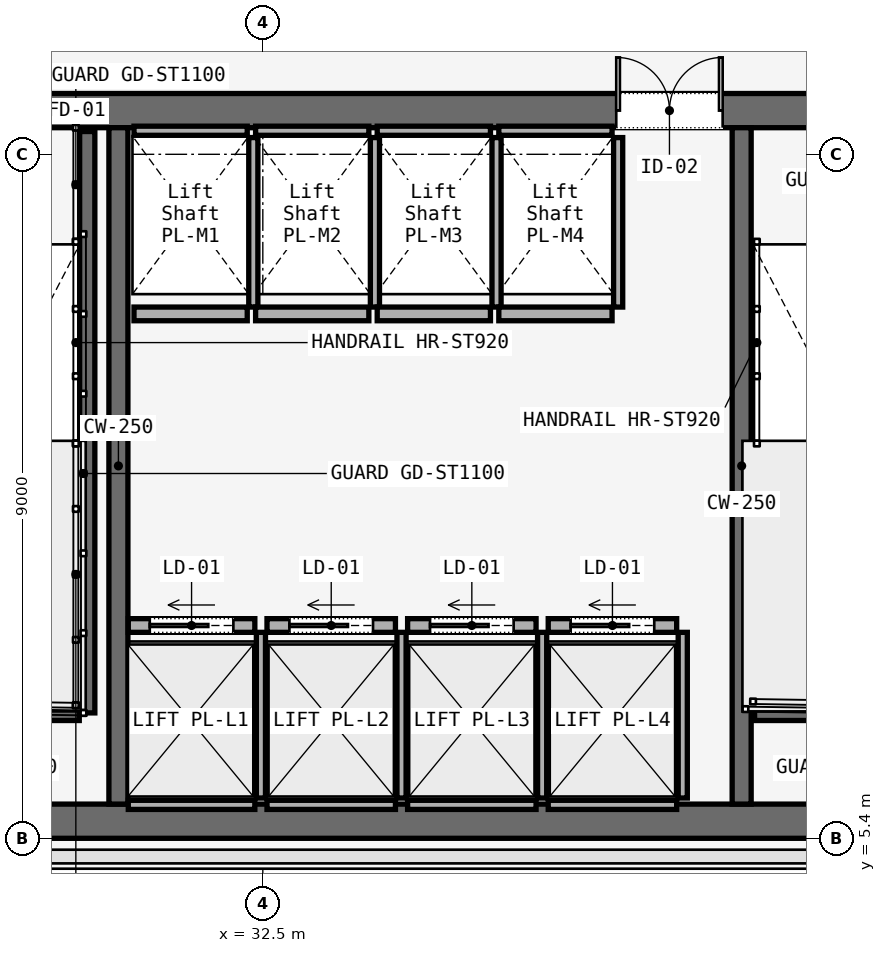
"""IFC4 building model, lengths in metres.
Left out: names, types, materials, properties, quantities, classifications, styles, units other than length and angle.
Written with IfcOpenShell. Run it as: python <this file> out.ifc"""

import sys

from ifc_helpers import new_model, si_unit, direction, frame, frame_2d, origin, place, context, subcontext, project, spatial, rectangle, extrude, element, fill, save


model = new_model("IFC4")
c1 = context("Model", 3, precision=1e-05, world=origin(), true_north=direction((0.0, 1.0)))
c2 = subcontext(c1, "Body", "Model", "MODEL_VIEW")
j1 = project(units=[si_unit("LENGTHUNIT", "METRE"), si_unit("PLANEANGLEUNIT", "RADIAN")], contexts=[c1])
p1 = place(None, origin())
s1 = spatial("IfcSite", under=j1, at=p1, CompositionType="ELEMENT")
p2 = place(p1, origin())
s2 = spatial("IfcBuilding", under=s1, at=p2, CompositionType="ELEMENT")
p3 = place(p2, frame((0.0, 0.0, 96.8)))
s3 = spatial("IfcBuildingStorey", under=s2, at=p3, CompositionType="ELEMENT", Elevation=96.8)
p4 = place(p3, frame((26.45, 14.975, 0.0), z_axis=(0.0, 0.0, 1.0), x_axis=(1.0, 0.0, 0.0)))
e1 = element("IfcWall", 1, at=p4, inside=s3, PredefinedType="SOLIDWALL", context=c2, shape_type="SweptSolid", body=[
    extrude(rectangle(XDim=31.1, YDim=0.45, at=frame_2d((15.55, 0.0))), origin(), (0.0, 0.0, 1.0), 3.58),
])
p5 = place(p4, frame((1.65, 0.0, 0.0)))
e2 = element("IfcOpeningElement", 2, at=p5, cuts=e1, PredefinedType="OPENING", context=c2, shape_type="SweptSolid", body=[
    extrude(rectangle(XDim=1.1, YDim=2.2, at=frame_2d((0.55, 1.1))), frame((0.0, 0.225, 0.0), z_axis=(0.0, -1.0, 0.0), x_axis=(1.0, 0.0, 0.0)), (0.0, 0.0, 1.0), 0.45),
])
p6 = place(p4, frame((13.65, 0.0, 0.0)))
e3 = element("IfcOpeningElement", 3, at=p6, cuts=e1, PredefinedType="OPENING", context=c2, shape_type="SweptSolid", body=[
    extrude(rectangle(XDim=1.1, YDim=2.2, at=frame_2d((0.55, 1.1))), frame((0.0, 0.225, 0.0), z_axis=(0.0, -1.0, 0.0), x_axis=(1.0, 0.0, 0.0)), (0.0, 0.0, 1.0), 0.45),
])
p7 = place(p4, frame((25.55, 0.0, 0.0)))
e4 = element("IfcOpeningElement", 4, at=p7, cuts=e1, PredefinedType="OPENING", context=c2, shape_type="SweptSolid", body=[
    extrude(rectangle(XDim=1.1, YDim=2.2, at=frame_2d((0.55, 1.1))), frame((0.0, 0.225, 0.0), z_axis=(0.0, -1.0, 0.0), x_axis=(1.0, 0.0, 0.0)), (0.0, 0.0, 1.0), 0.45),
])
p8 = place(p4, frame((10.7, 0.0, 0.0)))
e5 = element("IfcOpeningElement", 5, at=p8, cuts=e1, PredefinedType="OPENING", context=c2, shape_type="SweptSolid", body=[
    extrude(rectangle(XDim=1.4, YDim=2.2, at=frame_2d((0.7, 1.1))), frame((0.0, 0.225, 0.0), z_axis=(0.0, -1.0, 0.0), x_axis=(1.0, 0.0, 0.0)), (0.0, 0.0, 1.0), 0.45),
])
p9 = place(p4, frame((19.35, 0.0, 0.0)))
e6 = element("IfcOpeningElement", 6, at=p9, cuts=e1, PredefinedType="OPENING", context=c2, shape_type="SweptSolid", body=[
    extrude(rectangle(XDim=1.1, YDim=2.2, at=frame_2d((0.55, 1.1))), frame((0.0, 0.225, 0.0), z_axis=(0.0, -1.0, 0.0), x_axis=(1.0, 0.0, 0.0)), (0.0, 0.0, 1.0), 0.45),
])
p10 = place(p4, frame((21.4, 0.0, 0.0)))
e7 = element("IfcOpeningElement", 7, at=p10, cuts=e1, PredefinedType="OPENING", context=c2, shape_type="SweptSolid", body=[
    extrude(rectangle(XDim=0.9, YDim=2.1, at=frame_2d((0.45, 1.05))), frame((0.0, 0.225, 0.0), z_axis=(0.0, -1.0, 0.0), x_axis=(1.0, 0.0, 0.0)), (0.0, 0.0, 1.0), 0.45),
])
p11 = place(p4, frame((23.35, 0.0, 0.0)))
e8 = element("IfcOpeningElement", 8, at=p11, cuts=e1, PredefinedType="OPENING", context=c2, shape_type="SweptSolid", body=[
    extrude(rectangle(XDim=1.3, YDim=2.3, at=frame_2d((0.65, 1.15))), frame((0.0, 0.225, 0.0), z_axis=(0.0, -1.0, 0.0), x_axis=(1.0, 0.0, 0.0)), (0.0, 0.0, 1.0), 0.45),
])
p12 = place(p3, frame((26.45, 5.625, 0.0), z_axis=(0.0, 0.0, 1.0), x_axis=(1.0, 0.0, 0.0)))
e9 = element("IfcWall", 9, at=p12, inside=s3, PredefinedType="SOLIDWALL", context=c2, shape_type="SweptSolid", body=[
    extrude(rectangle(XDim=31.1, YDim=0.45, at=frame_2d((15.55, 0.0))), origin(), (0.0, 0.0, 1.0), 3.58),
])
for number, where, z_axis, x_axis in (
    (10, (30.6, 5.85, 0.0), (0.0, 0.0, 1.0), (0.0, 1.0, 0.0)),
    (11, (38.8, 5.85, 0.0), (0.0, 0.0, 1.0), (0.0, 1.0, 0.0)),
):
    element("IfcWall", number, at=place(p3, frame(where, z_axis=z_axis, x_axis=x_axis)), inside=s3, PredefinedType="SOLIDWALL", context=c2, shape_type="SweptSolid", body=[
        extrude(rectangle(XDim=8.9, YDim=0.25, at=frame_2d((4.45, 0.0))), origin(), (0.0, 0.0, 1.0), 3.58),
    ])
p13 = place(p3, frame((30.19, 14.7, 0.0), z_axis=(0.0, 0.0, 1.0), x_axis=(0.0, -1.0, 0.0)))
e12 = element("IfcWall", 12, at=p13, inside=s3, PredefinedType="SOLIDWALL", context=c2, shape_type="SweptSolid", body=[
    extrude(rectangle(XDim=7.65, YDim=0.2, at=frame_2d((3.825, 0.0))), origin(), (0.0, 0.0, 1.0), 3.8),
])
for number, where, z_axis, x_axis in (
    (13, (26.97, 7.05, 0.0), (0.0, 0.0, 1.0), (1.0, 0.0, 0.0)),
    (14, (38.97, 7.05, 0.0), (0.0, 0.0, 1.0), (1.0, 0.0, 0.0)),
):
    element("IfcWall", number, at=place(p3, frame(where, z_axis=z_axis, x_axis=x_axis)), inside=s3, PredefinedType="SOLIDWALL", context=c2, shape_type="SweptSolid", body=[
        extrude(rectangle(XDim=3.115, YDim=0.2, at=frame_2d((1.558, 0.0))), origin(), (0.0, 0.0, 1.0), 3.8),
    ])
p14 = place(p3, frame((30.73, 8.2, 0.0), z_axis=(0.0, 0.0, 1.0), x_axis=(1.0, 0.0, 0.0)))
e15 = element("IfcWall", 15, at=p14, inside=s3, PredefinedType="SOLIDWALL", context=c2, shape_type="SweptSolid", body=[
    extrude(rectangle(XDim=1.665, YDim=0.18, at=frame_2d((0.833, 0.0))), origin(), (0.0, 0.0, 1.0), 2.95),
])
p15 = place(p14, frame((0.282, 0.0, 0.0)))
e16 = element("IfcOpeningElement", 16, at=p15, cuts=e15, PredefinedType="OPENING", context=c2, shape_type="SweptSolid", body=[
    extrude(rectangle(XDim=1.1, YDim=2.2, at=frame_2d((0.55, 1.1))), frame((0.0, 0.09, 0.0), z_axis=(0.0, -1.0, 0.0), x_axis=(1.0, 0.0, 0.0)), (0.0, 0.0, 1.0), 0.18),
])
p16 = place(p3, frame((30.73, 5.84, 0.0), z_axis=(0.0, 0.0, 1.0), x_axis=(1.0, 0.0, 0.0)))
e17 = element("IfcWall", 17, at=p16, inside=s3, PredefinedType="SOLIDWALL", context=c2, shape_type="SweptSolid", body=[
    extrude(rectangle(XDim=1.665, YDim=0.12, at=frame_2d((0.833, 0.0))), origin(), (0.0, 0.0, 1.0), 2.95),
])
p17 = place(p3, frame((32.475, 5.93, 0.0), z_axis=(0.0, 0.0, 1.0), x_axis=(0.0, 1.0, 0.0)))
e18 = element("IfcWall", 18, at=p17, inside=s3, PredefinedType="SOLIDWALL", context=c2, shape_type="SweptSolid", body=[
    extrude(rectangle(XDim=2.18, YDim=0.12, at=frame_2d((1.09, 0.0))), origin(), (0.0, 0.0, 1.0), 2.95),
])
p18 = place(p3, frame((32.555, 8.2, 0.0), z_axis=(0.0, 0.0, 1.0), x_axis=(1.0, 0.0, 0.0)))
e19 = element("IfcWall", 19, at=p18, inside=s3, PredefinedType="SOLIDWALL", context=c2, shape_type="SweptSolid", body=[
    extrude(rectangle(XDim=1.69, YDim=0.18, at=frame_2d((0.845, 0.0))), origin(), (0.0, 0.0, 1.0), 2.95),
])
p19 = place(p18, frame((0.295, 0.0, 0.0)))
e20 = element("IfcOpeningElement", 20, at=p19, cuts=e19, PredefinedType="OPENING", context=c2, shape_type="SweptSolid", body=[
    extrude(rectangle(XDim=1.1, YDim=2.2, at=frame_2d((0.55, 1.1))), frame((0.0, 0.09, 0.0), z_axis=(0.0, -1.0, 0.0), x_axis=(1.0, 0.0, 0.0)), (0.0, 0.0, 1.0), 0.18),
])
p20 = place(p3, frame((32.555, 5.84, 0.0), z_axis=(0.0, 0.0, 1.0), x_axis=(1.0, 0.0, 0.0)))
e21 = element("IfcWall", 21, at=p20, inside=s3, PredefinedType="SOLIDWALL", context=c2, shape_type="SweptSolid", body=[
    extrude(rectangle(XDim=1.69, YDim=0.12, at=frame_2d((0.845, 0.0))), origin(), (0.0, 0.0, 1.0), 2.95),
])
p21 = place(p3, frame((34.325, 5.93, 0.0), z_axis=(0.0, 0.0, 1.0), x_axis=(0.0, 1.0, 0.0)))
e22 = element("IfcWall", 22, at=p21, inside=s3, PredefinedType="SOLIDWALL", context=c2, shape_type="SweptSolid", body=[
    extrude(rectangle(XDim=2.18, YDim=0.12, at=frame_2d((1.09, 0.0))), origin(), (0.0, 0.0, 1.0), 2.95),
])
p22 = place(p3, frame((34.405, 8.2, 0.0), z_axis=(0.0, 0.0, 1.0), x_axis=(1.0, 0.0, 0.0)))
e23 = element("IfcWall", 23, at=p22, inside=s3, PredefinedType="SOLIDWALL", context=c2, shape_type="SweptSolid", body=[
    extrude(rectangle(XDim=1.69, YDim=0.18, at=frame_2d((0.845, 0.0))), origin(), (0.0, 0.0, 1.0), 2.95),
])
p23 = place(p22, frame((0.295, 0.0, 0.0)))
e24 = element("IfcOpeningElement", 24, at=p23, cuts=e23, PredefinedType="OPENING", context=c2, shape_type="SweptSolid", body=[
    extrude(rectangle(XDim=1.1, YDim=2.2, at=frame_2d((0.55, 1.1))), frame((0.0, 0.09, 0.0), z_axis=(0.0, -1.0, 0.0), x_axis=(1.0, 0.0, 0.0)), (0.0, 0.0, 1.0), 0.18),
])
p24 = place(p3, frame((34.405, 5.84, 0.0), z_axis=(0.0, 0.0, 1.0), x_axis=(1.0, 0.0, 0.0)))
e25 = element("IfcWall", 25, at=p24, inside=s3, PredefinedType="SOLIDWALL", context=c2, shape_type="SweptSolid", body=[
    extrude(rectangle(XDim=1.69, YDim=0.12, at=frame_2d((0.845, 0.0))), origin(), (0.0, 0.0, 1.0), 2.95),
])
p25 = place(p3, frame((36.175, 5.93, 0.0), z_axis=(0.0, 0.0, 1.0), x_axis=(0.0, 1.0, 0.0)))
e26 = element("IfcWall", 26, at=p25, inside=s3, PredefinedType="SOLIDWALL", context=c2, shape_type="SweptSolid", body=[
    extrude(rectangle(XDim=2.18, YDim=0.12, at=frame_2d((1.09, 0.0))), origin(), (0.0, 0.0, 1.0), 2.95),
])
p26 = place(p3, frame((36.255, 8.2, 0.0), z_axis=(0.0, 0.0, 1.0), x_axis=(1.0, 0.0, 0.0)))
e27 = element("IfcWall", 27, at=p26, inside=s3, PredefinedType="SOLIDWALL", context=c2, shape_type="SweptSolid", body=[
    extrude(rectangle(XDim=1.69, YDim=0.18, at=frame_2d((0.845, 0.0))), origin(), (0.0, 0.0, 1.0), 2.95),
])
p27 = place(p26, frame((0.295, 0.0, 0.0)))
e28 = element("IfcOpeningElement", 28, at=p27, cuts=e27, PredefinedType="OPENING", context=c2, shape_type="SweptSolid", body=[
    extrude(rectangle(XDim=1.1, YDim=2.2, at=frame_2d((0.55, 1.1))), frame((0.0, 0.09, 0.0), z_axis=(0.0, -1.0, 0.0), x_axis=(1.0, 0.0, 0.0)), (0.0, 0.0, 1.0), 0.18),
])
p28 = place(p3, frame((36.255, 5.84, 0.0), z_axis=(0.0, 0.0, 1.0), x_axis=(1.0, 0.0, 0.0)))
e29 = element("IfcWall", 29, at=p28, inside=s3, PredefinedType="SOLIDWALL", context=c2, shape_type="SweptSolid", body=[
    extrude(rectangle(XDim=1.69, YDim=0.12, at=frame_2d((0.845, 0.0))), origin(), (0.0, 0.0, 1.0), 2.95),
])
p29 = place(p3, frame((38.025, 5.93, 0.0), z_axis=(0.0, 0.0, 1.0), x_axis=(0.0, 1.0, 0.0)))
e30 = element("IfcWall", 30, at=p29, inside=s3, PredefinedType="SOLIDWALL", context=c2, shape_type="SweptSolid", body=[
    extrude(rectangle(XDim=2.18, YDim=0.12, at=frame_2d((1.09, 0.0))), origin(), (0.0, 0.0, 1.0), 2.95),
])
p30 = place(p3, frame((30.805, 12.3, 0.0), z_axis=(0.0, 0.0, 1.0), x_axis=(1.0, 0.0, 0.0)))
e31 = element("IfcWall", 31, at=p30, inside=s3, PredefinedType="SOLIDWALL", context=c2, shape_type="SweptSolid", body=[
    extrude(rectangle(XDim=1.49, YDim=0.18, at=frame_2d((0.745, 0.0))), origin(), (0.0, 0.0, 1.0), 2.95),
])
p31 = place(p3, frame((30.805, 14.71, 0.0), z_axis=(0.0, 0.0, 1.0), x_axis=(1.0, 0.0, 0.0)))
e32 = element("IfcWall", 32, at=p31, inside=s3, PredefinedType="SOLIDWALL", context=c2, shape_type="SweptSolid", body=[
    extrude(rectangle(XDim=1.49, YDim=0.12, at=frame_2d((0.745, 0.0))), origin(), (0.0, 0.0, 1.0), 2.95),
])
p32 = place(p3, frame((32.375, 12.39, 0.0), z_axis=(0.0, 0.0, 1.0), x_axis=(0.0, 1.0, 0.0)))
e33 = element("IfcWall", 33, at=p32, inside=s3, PredefinedType="SOLIDWALL", context=c2, shape_type="SweptSolid", body=[
    extrude(rectangle(XDim=2.23, YDim=0.12, at=frame_2d((1.115, 0.0))), origin(), (0.0, 0.0, 1.0), 2.95),
])
p33 = place(p3, frame((32.405, 12.3, 0.0), z_axis=(0.0, 0.0, 1.0), x_axis=(1.0, 0.0, 0.0)))
e34 = element("IfcWall", 34, at=p33, inside=s3, PredefinedType="SOLIDWALL", context=c2, shape_type="SweptSolid", body=[
    extrude(rectangle(XDim=1.49, YDim=0.18, at=frame_2d((0.745, 0.0))), origin(), (0.0, 0.0, 1.0), 2.95),
])
p34 = place(p3, frame((32.405, 14.71, 0.0), z_axis=(0.0, 0.0, 1.0), x_axis=(1.0, 0.0, 0.0)))
e35 = element("IfcWall", 35, at=p34, inside=s3, PredefinedType="SOLIDWALL", context=c2, shape_type="SweptSolid", body=[
    extrude(rectangle(XDim=1.49, YDim=0.12, at=frame_2d((0.745, 0.0))), origin(), (0.0, 0.0, 1.0), 2.95),
])
p35 = place(p3, frame((33.975, 12.39, 0.0), z_axis=(0.0, 0.0, 1.0), x_axis=(0.0, 1.0, 0.0)))
e36 = element("IfcWall", 36, at=p35, inside=s3, PredefinedType="SOLIDWALL", context=c2, shape_type="SweptSolid", body=[
    extrude(rectangle(XDim=2.23, YDim=0.12, at=frame_2d((1.115, 0.0))), origin(), (0.0, 0.0, 1.0), 2.95),
])
p36 = place(p3, frame((34.005, 12.3, 0.0), z_axis=(0.0, 0.0, 1.0), x_axis=(1.0, 0.0, 0.0)))
e37 = element("IfcWall", 37, at=p36, inside=s3, PredefinedType="SOLIDWALL", context=c2, shape_type="SweptSolid", body=[
    extrude(rectangle(XDim=1.49, YDim=0.18, at=frame_2d((0.745, 0.0))), origin(), (0.0, 0.0, 1.0), 2.95),
])
p37 = place(p3, frame((34.005, 14.71, 0.0), z_axis=(0.0, 0.0, 1.0), x_axis=(1.0, 0.0, 0.0)))
e38 = element("IfcWall", 38, at=p37, inside=s3, PredefinedType="SOLIDWALL", context=c2, shape_type="SweptSolid", body=[
    extrude(rectangle(XDim=1.49, YDim=0.12, at=frame_2d((0.745, 0.0))), origin(), (0.0, 0.0, 1.0), 2.95),
])
p38 = place(p3, frame((35.575, 12.39, 0.0), z_axis=(0.0, 0.0, 1.0), x_axis=(0.0, 1.0, 0.0)))
e39 = element("IfcWall", 39, at=p38, inside=s3, PredefinedType="SOLIDWALL", context=c2, shape_type="SweptSolid", body=[
    extrude(rectangle(XDim=2.23, YDim=0.12, at=frame_2d((1.115, 0.0))), origin(), (0.0, 0.0, 1.0), 2.95),
])
p39 = place(p3, frame((35.605, 12.3, 0.0), z_axis=(0.0, 0.0, 1.0), x_axis=(1.0, 0.0, 0.0)))
e40 = element("IfcWall", 40, at=p39, inside=s3, PredefinedType="SOLIDWALL", context=c2, shape_type="SweptSolid", body=[
    extrude(rectangle(XDim=1.49, YDim=0.18, at=frame_2d((0.745, 0.0))), origin(), (0.0, 0.0, 1.0), 2.95),
])
p40 = place(p3, frame((35.605, 14.71, 0.0), z_axis=(0.0, 0.0, 1.0), x_axis=(1.0, 0.0, 0.0)))
e41 = element("IfcWall", 41, at=p40, inside=s3, PredefinedType="SOLIDWALL", context=c2, shape_type="SweptSolid", body=[
    extrude(rectangle(XDim=1.49, YDim=0.12, at=frame_2d((0.745, 0.0))), origin(), (0.0, 0.0, 1.0), 2.95),
])
p41 = place(p3, frame((37.175, 12.39, 0.0), z_axis=(0.0, 0.0, 1.0), x_axis=(0.0, 1.0, 0.0)))
e42 = element("IfcWall", 42, at=p41, inside=s3, PredefinedType="SOLIDWALL", context=c2, shape_type="SweptSolid", body=[
    extrude(rectangle(XDim=2.23, YDim=0.12, at=frame_2d((1.115, 0.0))), origin(), (0.0, 0.0, 1.0), 2.95),
])
p42 = place(p8, origin())
e43 = element("IfcDoor", 43, at=p42, inside=s3, OperationType="DOUBLE_DOOR_SINGLE_SWING", PredefinedType="DOOR", context=c2, shape_type="SweptSolid", body=[
    extrude(rectangle(XDim=1.4, YDim=2.2, at=frame_2d((0.7, 1.1))), frame((0.0, 0.025, 0.0), z_axis=(0.0, -1.0, 0.0), x_axis=(1.0, 0.0, 0.0)), (0.0, 0.0, 1.0), 0.05),
])
fill(e5, e43)
p43 = place(p15, origin())
e44 = element("IfcDoor", 44, at=p43, inside=s3, OperationType="SLIDING_TO_LEFT", PredefinedType="DOOR", context=c2, shape_type="SweptSolid", body=[
    extrude(rectangle(XDim=1.1, YDim=2.2, at=frame_2d((0.55, 1.1))), frame((0.0, 0.025, 0.0), z_axis=(0.0, -1.0, 0.0), x_axis=(1.0, 0.0, 0.0)), (0.0, 0.0, 1.0), 0.05),
])
fill(e16, e44)
p44 = place(p19, origin())
e45 = element("IfcDoor", 45, at=p44, inside=s3, OperationType="SLIDING_TO_LEFT", PredefinedType="DOOR", context=c2, shape_type="SweptSolid", body=[
    extrude(rectangle(XDim=1.1, YDim=2.2, at=frame_2d((0.55, 1.1))), frame((0.0, 0.025, 0.0), z_axis=(0.0, -1.0, 0.0), x_axis=(1.0, 0.0, 0.0)), (0.0, 0.0, 1.0), 0.05),
])
fill(e20, e45)
p45 = place(p23, origin())
e46 = element("IfcDoor", 46, at=p45, inside=s3, OperationType="SLIDING_TO_LEFT", PredefinedType="DOOR", context=c2, shape_type="SweptSolid", body=[
    extrude(rectangle(XDim=1.1, YDim=2.2, at=frame_2d((0.55, 1.1))), frame((0.0, 0.025, 0.0), z_axis=(0.0, -1.0, 0.0), x_axis=(1.0, 0.0, 0.0)), (0.0, 0.0, 1.0), 0.05),
])
fill(e24, e46)
p46 = place(p27, origin())
e47 = element("IfcDoor", 47, at=p46, inside=s3, OperationType="SLIDING_TO_LEFT", PredefinedType="DOOR", context=c2, shape_type="SweptSolid", body=[
    extrude(rectangle(XDim=1.1, YDim=2.2, at=frame_2d((0.55, 1.1))), frame((0.0, 0.025, 0.0), z_axis=(0.0, -1.0, 0.0), x_axis=(1.0, 0.0, 0.0)), (0.0, 0.0, 1.0), 0.05),
])
fill(e28, e47)
save(model, sys.argv[1])
